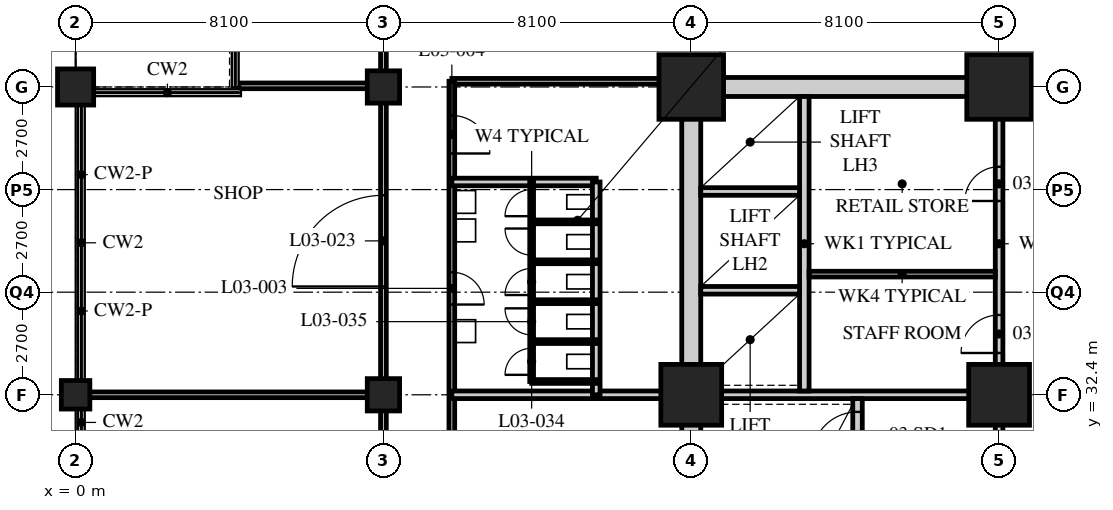
"""IFC4 building model, lengths in metres.
Left out: names, types, materials, properties, quantities, classifications, styles, units other than length and angle.
Written with IfcOpenShell. Run it as: python <this file> out.ifc"""

import sys

from ifc_helpers import new_model, si_unit, direction, frame, frame_2d, origin, origin_2d, place, context, subcontext, project, spatial, rectangle, hollow_rectangle, extrude, element, fill, save


model = new_model("IFC4")
c1 = context("Model", 3, precision=1e-05, world=origin(), true_north=direction((0.0, 1.0)))
c2 = subcontext(c1, "Body", "Model", "MODEL_VIEW")
j1 = project(units=[si_unit("LENGTHUNIT", "METRE"), si_unit("PLANEANGLEUNIT", "RADIAN")], contexts=[c1])
p1 = place(None, origin())
s1 = spatial("IfcSite", under=j1, at=p1, CompositionType="ELEMENT")
p2 = place(p1, origin())
s2 = spatial("IfcBuilding", under=s1, at=p2, CompositionType="ELEMENT")
p3 = place(p2, frame((0.0, 0.0, 16.8)))
s3 = spatial("IfcBuildingStorey", under=s2, at=p3, CompositionType="ELEMENT", Elevation=16.8)
p4 = place(p3, frame((0.0, 32.4, 0.0), z_axis=(0.0, 0.0, 1.0), x_axis=(1.0, 0.0, 0.0)))
e1 = element("IfcColumn", 1, at=p4, inside=s3, PredefinedType="COLUMN", context=c2, shape_type="SweptSolid", body=[
    extrude(hollow_rectangle(XDim=0.75, YDim=0.75, WallThickness=0.07, at=origin_2d()), origin(), (0.0, 0.0, 1.0), 5.4),
])
p5 = place(p3, frame((0.0, 40.5, 0.0), z_axis=(0.0, 0.0, 1.0), x_axis=(1.0, 0.0, 0.0)))
e2 = element("IfcColumn", 2, at=p5, inside=s3, PredefinedType="COLUMN", context=c2, shape_type="SweptSolid", body=[
    extrude(hollow_rectangle(XDim=0.95, YDim=0.95, WallThickness=0.1, at=origin_2d()), origin(), (0.0, 0.0, 1.0), 5.4),
])
for number, where, z_axis, x_axis in (
    (3, (8.1, 32.4, 0.0), (0.0, 0.0, 1.0), (1.0, 0.0, 0.0)),
    (4, (8.1, 40.5, 0.0), (0.0, 0.0, 1.0), (1.0, 0.0, 0.0)),
):
    element("IfcColumn", number, at=place(p3, frame(where, z_axis=z_axis, x_axis=x_axis)), inside=s3, PredefinedType="COLUMN", context=c2, shape_type="SweptSolid", body=[
        extrude(hollow_rectangle(XDim=0.85, YDim=0.85, WallThickness=0.085, at=origin_2d()), origin(), (0.0, 0.0, 1.0), 5.4),
    ])
p6 = place(p3, frame((16.2, 32.4, 0.0), z_axis=(0.0, 0.0, 1.0), x_axis=(1.0, 0.0, 0.0)))
e5 = element("IfcColumn", 5, at=p6, inside=s3, PredefinedType="COLUMN", context=c2, shape_type="SweptSolid", body=[
    extrude(hollow_rectangle(XDim=1.6, YDim=1.6, WallThickness=0.15, at=origin_2d()), origin(), (0.0, 0.0, 1.0), 5.4),
])
p7 = place(p3, frame((16.2, 40.5, 0.0), z_axis=(0.0, 0.0, 1.0), x_axis=(1.0, 0.0, 0.0)))
e6 = element("IfcColumn", 6, at=p7, inside=s3, PredefinedType="COLUMN", context=c2, shape_type="SweptSolid", body=[
    extrude(hollow_rectangle(XDim=1.7, YDim=1.7, WallThickness=0.16, at=origin_2d()), origin(), (0.0, 0.0, 1.0), 5.4),
])
p8 = place(p3, frame((24.3, 32.4, 0.0), z_axis=(0.0, 0.0, 1.0), x_axis=(1.0, 0.0, 0.0)))
e7 = element("IfcColumn", 7, at=p8, inside=s3, PredefinedType="COLUMN", context=c2, shape_type="SweptSolid", body=[
    extrude(hollow_rectangle(XDim=1.6, YDim=1.6, WallThickness=0.15, at=origin_2d()), origin(), (0.0, 0.0, 1.0), 5.4),
])
p9 = place(p3, frame((24.3, 40.5, 0.0), z_axis=(0.0, 0.0, 1.0), x_axis=(1.0, 0.0, 0.0)))
e8 = element("IfcColumn", 8, at=p9, inside=s3, PredefinedType="COLUMN", context=c2, shape_type="SweptSolid", body=[
    extrude(hollow_rectangle(XDim=1.7, YDim=1.7, WallThickness=0.16, at=origin_2d()), origin(), (0.0, 0.0, 1.0), 5.4),
])
p10 = place(p3, frame((8.1, 8.1, 0.0), z_axis=(0.0, 0.0, 1.0), x_axis=(0.0, 1.0, 0.0)))
e9 = element("IfcWall", 9, at=p10, inside=s3, PredefinedType="PARTITIONING", context=c2, shape_type="SweptSolid", body=[
    extrude(rectangle(XDim=34.35, YDim=0.15, at=frame_2d((17.175, 0.0))), origin(), (0.0, 0.0, 1.0), 4.538),
])
p11 = place(p10, frame((8.95, 0.0, 0.0)))
e10 = element("IfcOpeningElement", 10, at=p11, cuts=e9, PredefinedType="OPENING", context=c2, shape_type="SweptSolid", body=[
    extrude(rectangle(XDim=1.8, YDim=2.4, at=frame_2d((0.9, 1.2))), frame((0.0, 0.085, 0.0), z_axis=(0.0, -1.0, 0.0), x_axis=(1.0, 0.0, 0.0)), (0.0, 0.0, 1.0), 0.17),
])
p12 = place(p10, frame((19.35, 0.0, 0.0)))
e11 = element("IfcOpeningElement", 11, at=p12, cuts=e9, PredefinedType="OPENING", context=c2, shape_type="SweptSolid", body=[
    extrude(rectangle(XDim=1.8, YDim=2.4, at=frame_2d((0.9, 1.2))), frame((0.0, 0.085, 0.0), z_axis=(0.0, -1.0, 0.0), x_axis=(1.0, 0.0, 0.0)), (0.0, 0.0, 1.0), 0.17),
])
p13 = place(p10, frame((27.15, 0.0, 0.0)))
e12 = element("IfcOpeningElement", 12, at=p13, cuts=e9, PredefinedType="OPENING", context=c2, shape_type="SweptSolid", body=[
    extrude(rectangle(XDim=2.4, YDim=2.7, at=frame_2d((1.2, 1.35))), frame((0.0, 0.085, 0.0), z_axis=(0.0, -1.0, 0.0), x_axis=(1.0, 0.0, 0.0)), (0.0, 0.0, 1.0), 0.17),
])
p14 = place(p3, frame((16.068, 40.65, 0.0), z_axis=(0.0, 0.0, 1.0), x_axis=(-1.0, 0.0, 0.0)))
e13 = element("IfcWall", 13, at=p14, inside=s3, PredefinedType="PARTITIONING", context=c2, shape_type="SweptSolid", body=[
    extrude(rectangle(XDim=6.168, YDim=0.15, at=frame_2d((3.084, 0.0))), origin(), (0.0, 0.0, 1.0), 4.538),
])
p15 = place(p3, frame((9.9, 40.65, 0.0), z_axis=(0.0, 0.0, 1.0), x_axis=(0.0, -1.0, 0.0)))
e14 = element("IfcWall", 14, at=p15, inside=s3, PredefinedType="PARTITIONING", context=c2, shape_type="SweptSolid", body=[
    extrude(rectangle(XDim=30.75, YDim=0.15, at=frame_2d((15.375, 0.0))), origin(), (0.0, 0.0, 1.0), 5.15),
])
p16 = place(p15, frame((13.525, 0.0, 0.0)))
e15 = element("IfcOpeningElement", 15, at=p16, cuts=e14, PredefinedType="OPENING", context=c2, shape_type="SweptSolid", body=[
    extrude(rectangle(XDim=0.85, YDim=2.1, at=frame_2d((0.425, 1.05))), frame((0.0, 0.085, 0.0), z_axis=(0.0, -1.0, 0.0), x_axis=(1.0, 0.0, 0.0)), (0.0, 0.0, 1.0), 0.17),
])
p17 = place(p15, frame((9.4, 0.0, 0.0)))
e16 = element("IfcOpeningElement", 16, at=p17, cuts=e14, PredefinedType="OPENING", context=c2, shape_type="SweptSolid", body=[
    extrude(rectangle(XDim=1.0, YDim=2.1, at=frame_2d((0.5, 1.05))), frame((0.0, 0.085, 0.0), z_axis=(0.0, -1.0, 0.0), x_axis=(1.0, 0.0, 0.0)), (0.0, 0.0, 1.0), 0.17),
])
p18 = place(p15, frame((5.025, 0.0, 0.0)))
e17 = element("IfcOpeningElement", 17, at=p18, cuts=e14, PredefinedType="OPENING", context=c2, shape_type="SweptSolid", body=[
    extrude(rectangle(XDim=0.85, YDim=2.1, at=frame_2d((0.425, 1.05))), frame((0.0, 0.085, 0.0), z_axis=(0.0, -1.0, 0.0), x_axis=(1.0, 0.0, 0.0)), (0.0, 0.0, 1.0), 0.17),
])
p19 = place(p15, frame((0.9, 0.0, 0.0)))
e18 = element("IfcOpeningElement", 18, at=p19, cuts=e14, PredefinedType="OPENING", context=c2, shape_type="SweptSolid", body=[
    extrude(rectangle(XDim=1.0, YDim=2.1, at=frame_2d((0.5, 1.05))), frame((0.0, 0.085, 0.0), z_axis=(0.0, -1.0, 0.0), x_axis=(1.0, 0.0, 0.0)), (0.0, 0.0, 1.0), 0.17),
])
p20 = place(p3, frame((9.9, 32.4, 0.0), z_axis=(0.0, 0.0, 1.0), x_axis=(1.0, 0.0, 0.0)))
e19 = element("IfcWall", 19, at=p20, inside=s3, PredefinedType="SOLIDWALL", context=c2, shape_type="SweptSolid", body=[
    extrude(rectangle(XDim=6.3, YDim=0.2, at=frame_2d((3.15, 0.0))), origin(), (0.0, 0.0, 1.0), 4.538),
])
p21 = place(p3, frame((9.9, 38.0, 0.0), z_axis=(0.0, 0.0, 1.0), x_axis=(1.0, 0.0, 0.0)))
e20 = element("IfcWall", 20, at=p21, inside=s3, PredefinedType="SOLIDWALL", context=c2, shape_type="SweptSolid", body=[
    extrude(rectangle(XDim=3.8, YDim=0.2, at=frame_2d((1.9, 0.0))), origin(), (0.0, 0.0, 1.0), 5.15),
])
p22 = place(p3, frame((13.7, 32.4, 0.0), z_axis=(0.0, 0.0, 1.0), x_axis=(0.0, 1.0, 0.0)))
e21 = element("IfcWall", 21, at=p22, inside=s3, PredefinedType="SOLIDWALL", context=c2, shape_type="SweptSolid", body=[
    extrude(rectangle(XDim=5.6, YDim=0.2, at=frame_2d((2.8, 0.0))), origin(), (0.0, 0.0, 1.0), 5.15),
])
p23 = place(p3, frame((8.1, 32.4, 0.0), z_axis=(0.0, 0.0, 1.0), x_axis=(-1.0, 0.0, 0.0)))
e22 = element("IfcWall", 22, at=p23, inside=s3, PredefinedType="PARTITIONING", context=c2, shape_type="SweptSolid", body=[
    extrude(rectangle(XDim=7.8, YDim=0.15, at=frame_2d((3.9, 0.0))), origin(), (0.0, 0.0, 1.0), 4.538),
])
p24 = place(p3, frame((4.293, 40.53, 0.0), z_axis=(0.0, 0.0, 1.0), x_axis=(1.0, 0.0, 0.0)))
e23 = element("IfcWall", 23, at=p24, inside=s3, PredefinedType="PARTITIONING", context=c2, shape_type="SweptSolid", body=[
    extrude(rectangle(XDim=3.807, YDim=0.15, at=frame_2d((1.904, 0.0))), origin(), (0.0, 0.0, 1.0), 4.538),
])
p25 = place(p3, frame((12.0, 32.75, 0.0), z_axis=(0.0, 0.0, 1.0), x_axis=(0.0, 1.0, 0.0)))
e24 = element("IfcWall", 24, at=p25, inside=s3, PredefinedType="PARTITIONING", context=c2, shape_type="SweptSolid", body=[
    extrude(rectangle(XDim=5.25, YDim=0.1, at=frame_2d((2.625, 0.0))), origin(), (0.0, 0.0, 1.0), 5.15),
])
p26 = place(p25, frame((0.175, 0.0, 0.0)))
e25 = element("IfcOpeningElement", 25, at=p26, cuts=e24, PredefinedType="OPENING", context=c2, shape_type="SweptSolid", body=[
    extrude(rectangle(XDim=0.7, YDim=2.0, at=frame_2d((0.35, 1.0))), frame((0.0, 0.06, 0.0), z_axis=(0.0, -1.0, 0.0), x_axis=(1.0, 0.0, 0.0)), (0.0, 0.0, 1.0), 0.12),
])
p27 = place(p25, frame((1.225, 0.0, 0.0)))
e26 = element("IfcOpeningElement", 26, at=p27, cuts=e24, PredefinedType="OPENING", context=c2, shape_type="SweptSolid", body=[
    extrude(rectangle(XDim=0.7, YDim=2.0, at=frame_2d((0.35, 1.0))), frame((0.0, 0.06, 0.0), z_axis=(0.0, -1.0, 0.0), x_axis=(1.0, 0.0, 0.0)), (0.0, 0.0, 1.0), 0.12),
])
p28 = place(p25, frame((2.275, 0.0, 0.0)))
e27 = element("IfcOpeningElement", 27, at=p28, cuts=e24, PredefinedType="OPENING", context=c2, shape_type="SweptSolid", body=[
    extrude(rectangle(XDim=0.7, YDim=2.0, at=frame_2d((0.35, 1.0))), frame((0.0, 0.06, 0.0), z_axis=(0.0, -1.0, 0.0), x_axis=(1.0, 0.0, 0.0)), (0.0, 0.0, 1.0), 0.12),
])
p29 = place(p25, frame((3.325, 0.0, 0.0)))
e28 = element("IfcOpeningElement", 28, at=p29, cuts=e24, PredefinedType="OPENING", context=c2, shape_type="SweptSolid", body=[
    extrude(rectangle(XDim=0.7, YDim=2.0, at=frame_2d((0.35, 1.0))), frame((0.0, 0.06, 0.0), z_axis=(0.0, -1.0, 0.0), x_axis=(1.0, 0.0, 0.0)), (0.0, 0.0, 1.0), 0.12),
])
p30 = place(p25, frame((4.35, 0.0, 0.0)))
e29 = element("IfcOpeningElement", 29, at=p30, cuts=e24, PredefinedType="OPENING", context=c2, shape_type="SweptSolid", body=[
    extrude(rectangle(XDim=0.7, YDim=2.0, at=frame_2d((0.35, 1.0))), frame((0.0, 0.06, 0.0), z_axis=(0.0, -1.0, 0.0), x_axis=(1.0, 0.0, 0.0)), (0.0, 0.0, 1.0), 0.12),
])
for number, where, z_axis, x_axis in (
    (30, (12.0, 32.75, 0.0), (0.0, 0.0, 1.0), (1.0, 0.0, 0.0)),
    (31, (12.0, 33.8, 0.0), (0.0, 0.0, 1.0), (1.0, 0.0, 0.0)),
    (32, (12.0, 34.85, 0.0), (0.0, 0.0, 1.0), (1.0, 0.0, 0.0)),
    (33, (12.0, 35.9, 0.0), (0.0, 0.0, 1.0), (1.0, 0.0, 0.0)),
    (34, (12.0, 36.95, 0.0), (0.0, 0.0, 1.0), (1.0, 0.0, 0.0)),
):
    element("IfcWall", number, at=place(p3, frame(where, z_axis=z_axis, x_axis=x_axis)), inside=s3, PredefinedType="PARTITIONING", context=c2, shape_type="SweptSolid", body=[
        extrude(rectangle(XDim=1.7, YDim=0.1, at=frame_2d((0.85, 0.0))), origin(), (0.0, 0.0, 1.0), 5.15),
    ])
p31 = place(p3, frame((15.95, 40.5, 0.0), z_axis=(0.0, 0.0, 1.0), x_axis=(1.0, 0.0, 0.0)))
e35 = element("IfcWall", 35, at=p31, inside=s3, PredefinedType="SOLIDWALL", context=c2, shape_type="SweptSolid", body=[
    extrude(rectangle(XDim=24.8, YDim=0.5, at=frame_2d((12.4, 0.0))), origin(), (0.0, 0.0, 1.0), 4.5),
])
p32 = place(p31, frame((11.5, 0.0, 0.0)))
e36 = element("IfcOpeningElement", 36, at=p32, cuts=e35, PredefinedType="OPENING", context=c2, shape_type="SweptSolid", body=[
    extrude(rectangle(XDim=1.8, YDim=2.4, at=frame_2d((0.9, 1.2))), frame((0.0, 0.26, 0.0), z_axis=(0.0, -1.0, 0.0), x_axis=(1.0, 0.0, 0.0)), (0.0, 0.0, 1.0), 0.52),
])
p33 = place(p3, frame((16.2, 24.55, 0.0), z_axis=(0.0, 0.0, 1.0), x_axis=(0.0, 1.0, 0.0)))
e37 = element("IfcWall", 37, at=p33, inside=s3, PredefinedType="SOLIDWALL", context=c2, shape_type="SweptSolid", body=[
    extrude(rectangle(XDim=15.7, YDim=0.5, at=frame_2d((7.85, 0.0))), origin(), (0.0, 0.0, 1.0), 4.538),
])
p34 = place(p3, frame((16.45, 32.4, 0.0), z_axis=(0.0, 0.0, 1.0), x_axis=(1.0, 0.0, 0.0)))
e38 = element("IfcWall", 38, at=p34, inside=s3, PredefinedType="SOLIDWALL", context=c2, shape_type="SweptSolid", body=[
    extrude(rectangle(XDim=7.95, YDim=0.2, at=frame_2d((3.975, 0.0))), origin(), (0.0, 0.0, 1.0), 4.45),
])
p35 = place(p3, frame((24.3, 24.55, 0.0), z_axis=(0.0, 0.0, 1.0), x_axis=(0.0, 1.0, 0.0)))
e39 = element("IfcWall", 39, at=p35, inside=s3, PredefinedType="SOLIDWALL", context=c2, shape_type="SweptSolid", body=[
    extrude(rectangle(XDim=7.75, YDim=0.2, at=frame_2d((3.875, 0.0))), origin(), (0.0, 0.0, 1.0), 4.45),
])
p36 = place(p35, frame((4.6, 0.0, 0.0)))
e40 = element("IfcOpeningElement", 40, at=p36, cuts=e39, PredefinedType="OPENING", context=c2, shape_type="SweptSolid", body=[
    extrude(rectangle(XDim=1.2, YDim=2.1, at=frame_2d((0.6, 1.05))), frame((0.0, 0.11, 0.0), z_axis=(0.0, -1.0, 0.0), x_axis=(1.0, 0.0, 0.0)), (0.0, 0.0, 1.0), 0.22),
])
p37 = place(p3, frame((20.575, 24.55, 0.0), z_axis=(0.0, 0.0, 1.0), x_axis=(0.0, 1.0, 0.0)))
e41 = element("IfcWall", 41, at=p37, inside=s3, PredefinedType="SOLIDWALL", context=c2, shape_type="SweptSolid", body=[
    extrude(rectangle(XDim=7.75, YDim=0.25, at=frame_2d((3.875, 0.0))), origin(), (0.0, 0.0, 1.0), 5.15),
])
p38 = place(p37, frame((6.2, 0.0, 0.0)))
e42 = element("IfcOpeningElement", 42, at=p38, cuts=e41, PredefinedType="OPENING", context=c2, shape_type="SweptSolid", body=[
    extrude(rectangle(XDim=1.2, YDim=2.1, at=frame_2d((0.6, 1.05))), frame((0.0, 0.135, 0.0), z_axis=(0.0, -1.0, 0.0), x_axis=(1.0, 0.0, 0.0)), (0.0, 0.0, 1.0), 0.27),
])
p39 = place(p3, frame((19.175, 32.5, 0.0), z_axis=(0.0, 0.0, 1.0), x_axis=(0.0, 1.0, 0.0)))
e43 = element("IfcWall", 43, at=p39, inside=s3, PredefinedType="SOLIDWALL", context=c2, shape_type="SweptSolid", body=[
    extrude(rectangle(XDim=7.75, YDim=0.25, at=frame_2d((3.875, 0.0))), origin(), (0.0, 0.0, 1.0), 5.15),
])
for number, where, z_axis, x_axis in (
    (44, (16.45, 35.15, 0.0), (0.0, 0.0, 1.0), (1.0, 0.0, 0.0)),
    (45, (16.45, 37.75, 0.0), (0.0, 0.0, 1.0), (1.0, 0.0, 0.0)),
):
    element("IfcWall", number, at=place(p3, frame(where, z_axis=z_axis, x_axis=x_axis)), inside=s3, PredefinedType="SOLIDWALL", context=c2, shape_type="SweptSolid", body=[
        extrude(rectangle(XDim=2.6, YDim=0.2, at=frame_2d((1.3, 0.0))), origin(), (0.0, 0.0, 1.0), 5.15),
    ])
p40 = place(p3, frame((24.3, 32.5, 0.0), z_axis=(0.0, 0.0, 1.0), x_axis=(0.0, 1.0, 0.0)))
e46 = element("IfcWall", 46, at=p40, inside=s3, PredefinedType="PARTITIONING", context=c2, shape_type="SweptSolid", body=[
    extrude(rectangle(XDim=7.75, YDim=0.2, at=frame_2d((3.875, 0.0))), origin(), (0.0, 0.0, 1.0), 4.45),
])
p41 = place(p40, frame((1.0, 0.0, 0.0)))
e47 = element("IfcOpeningElement", 47, at=p41, cuts=e46, PredefinedType="OPENING", context=c2, shape_type="SweptSolid", body=[
    extrude(rectangle(XDim=1.0, YDim=2.1, at=frame_2d((0.5, 1.05))), frame((0.0, 0.11, 0.0), z_axis=(0.0, -1.0, 0.0), x_axis=(1.0, 0.0, 0.0)), (0.0, 0.0, 1.0), 0.22),
])
p42 = place(p40, frame((5.0, 0.0, 0.0)))
e48 = element("IfcOpeningElement", 48, at=p42, cuts=e46, PredefinedType="OPENING", context=c2, shape_type="SweptSolid", body=[
    extrude(rectangle(XDim=0.9, YDim=2.1, at=frame_2d((0.45, 1.05))), frame((0.0, 0.11, 0.0), z_axis=(0.0, -1.0, 0.0), x_axis=(1.0, 0.0, 0.0)), (0.0, 0.0, 1.0), 0.22),
])
p43 = place(p3, frame((19.3, 35.575, 0.0), z_axis=(0.0, 0.0, 1.0), x_axis=(1.0, 0.0, 0.0)))
e49 = element("IfcWall", 49, at=p43, inside=s3, PredefinedType="PARTITIONING", context=c2, shape_type="SweptSolid", body=[
    extrude(rectangle(XDim=4.9, YDim=0.15, at=frame_2d((2.45, 0.0))), origin(), (0.0, 0.0, 1.0), 5.15),
])
p44 = place(p18, origin())
e50 = element("IfcDoor", 50, at=p44, inside=s3, OperationType="SINGLE_SWING_RIGHT", PredefinedType="DOOR", context=c2, shape_type="SweptSolid", body=[
    extrude(rectangle(XDim=0.85, YDim=2.1, at=frame_2d((0.425, 1.05))), frame((0.0, 0.025, 0.0), z_axis=(0.0, -1.0, 0.0), x_axis=(1.0, 0.0, 0.0)), (0.0, 0.0, 1.0), 0.05),
])
fill(e17, e50)
p45 = place(p19, origin())
e51 = element("IfcDoor", 51, at=p45, inside=s3, OperationType="SINGLE_SWING_RIGHT", PredefinedType="DOOR", context=c2, shape_type="SweptSolid", body=[
    extrude(rectangle(XDim=1.0, YDim=2.1, at=frame_2d((0.5, 1.05))), frame((0.0, 0.025, 0.0), z_axis=(0.0, -1.0, 0.0), x_axis=(1.0, 0.0, 0.0)), (0.0, 0.0, 1.0), 0.05),
])
fill(e18, e51)
p46 = place(p13, origin())
e52 = element("IfcDoor", 52, at=p46, inside=s3, OperationType="DOUBLE_DOOR_SINGLE_SWING", PredefinedType="DOOR", context=c2, shape_type="SweptSolid", body=[
    extrude(rectangle(XDim=2.4, YDim=2.7, at=frame_2d((1.2, 1.35))), frame((0.0, 0.025, 0.0), z_axis=(0.0, -1.0, 0.0), x_axis=(1.0, 0.0, 0.0)), (0.0, 0.0, 1.0), 0.05),
])
fill(e12, e52)
p47 = place(p26, origin())
e53 = element("IfcDoor", 53, at=p47, inside=s3, OperationType="SINGLE_SWING_LEFT", PredefinedType="DOOR", context=c2, shape_type="SweptSolid", body=[
    extrude(rectangle(XDim=0.7, YDim=2.0, at=frame_2d((0.35, 1.0))), frame((0.0, 0.025, 0.0), z_axis=(0.0, -1.0, 0.0), x_axis=(1.0, 0.0, 0.0)), (0.0, 0.0, 1.0), 0.05),
])
fill(e25, e53)
p48 = place(p27, origin())
e54 = element("IfcDoor", 54, at=p48, inside=s3, OperationType="SINGLE_SWING_RIGHT", PredefinedType="DOOR", context=c2, shape_type="SweptSolid", body=[
    extrude(rectangle(XDim=0.7, YDim=2.0, at=frame_2d((0.35, 1.0))), frame((0.0, 0.025, 0.0), z_axis=(0.0, -1.0, 0.0), x_axis=(1.0, 0.0, 0.0)), (0.0, 0.0, 1.0), 0.05),
])
fill(e26, e54)
p49 = place(p28, origin())
e55 = element("IfcDoor", 55, at=p49, inside=s3, OperationType="SINGLE_SWING_LEFT", PredefinedType="DOOR", context=c2, shape_type="SweptSolid", body=[
    extrude(rectangle(XDim=0.7, YDim=2.0, at=frame_2d((0.35, 1.0))), frame((0.0, 0.025, 0.0), z_axis=(0.0, -1.0, 0.0), x_axis=(1.0, 0.0, 0.0)), (0.0, 0.0, 1.0), 0.05),
])
fill(e27, e55)
p50 = place(p29, origin())
e56 = element("IfcDoor", 56, at=p50, inside=s3, OperationType="SINGLE_SWING_RIGHT", PredefinedType="DOOR", context=c2, shape_type="SweptSolid", body=[
    extrude(rectangle(XDim=0.7, YDim=2.0, at=frame_2d((0.35, 1.0))), frame((0.0, 0.025, 0.0), z_axis=(0.0, -1.0, 0.0), x_axis=(1.0, 0.0, 0.0)), (0.0, 0.0, 1.0), 0.05),
])
fill(e28, e56)
p51 = place(p30, origin())
e57 = element("IfcDoor", 57, at=p51, inside=s3, OperationType="SINGLE_SWING_LEFT", PredefinedType="DOOR", context=c2, shape_type="SweptSolid", body=[
    extrude(rectangle(XDim=0.7, YDim=2.0, at=frame_2d((0.35, 1.0))), frame((0.0, 0.025, 0.0), z_axis=(0.0, -1.0, 0.0), x_axis=(1.0, 0.0, 0.0)), (0.0, 0.0, 1.0), 0.05),
])
fill(e29, e57)
p52 = place(p41, origin())
e58 = element("IfcDoor", 58, at=p52, inside=s3, OperationType="SINGLE_SWING_LEFT", PredefinedType="DOOR", context=c2, shape_type="SweptSolid", body=[
    extrude(rectangle(XDim=1.0, YDim=2.1, at=frame_2d((0.5, 1.05))), frame((0.0, 0.025, 0.0), z_axis=(0.0, -1.0, 0.0), x_axis=(1.0, 0.0, 0.0)), (0.0, 0.0, 1.0), 0.05),
])
fill(e47, e58)
p53 = place(p42, origin())
e59 = element("IfcDoor", 59, at=p53, inside=s3, OperationType="SINGLE_SWING_LEFT", PredefinedType="DOOR", context=c2, shape_type="SweptSolid", body=[
    extrude(rectangle(XDim=0.9, YDim=2.1, at=frame_2d((0.45, 1.05))), frame((0.0, 0.025, 0.0), z_axis=(0.0, -1.0, 0.0), x_axis=(1.0, 0.0, 0.0)), (0.0, 0.0, 1.0), 0.05),
])
fill(e48, e59)
p54 = place(p38, origin())
e60 = element("IfcDoor", 60, at=p54, inside=s3, OperationType="SINGLE_SWING_LEFT", PredefinedType="DOOR", context=c2, shape_type="SweptSolid", body=[
    extrude(rectangle(XDim=1.2, YDim=2.1, at=frame_2d((0.6, 1.05))), frame((0.0, 0.025, 0.0), z_axis=(0.0, -1.0, 0.0), x_axis=(1.0, 0.0, 0.0)), (0.0, 0.0, 1.0), 0.05),
])
fill(e42, e60)
save(model, sys.argv[1])
